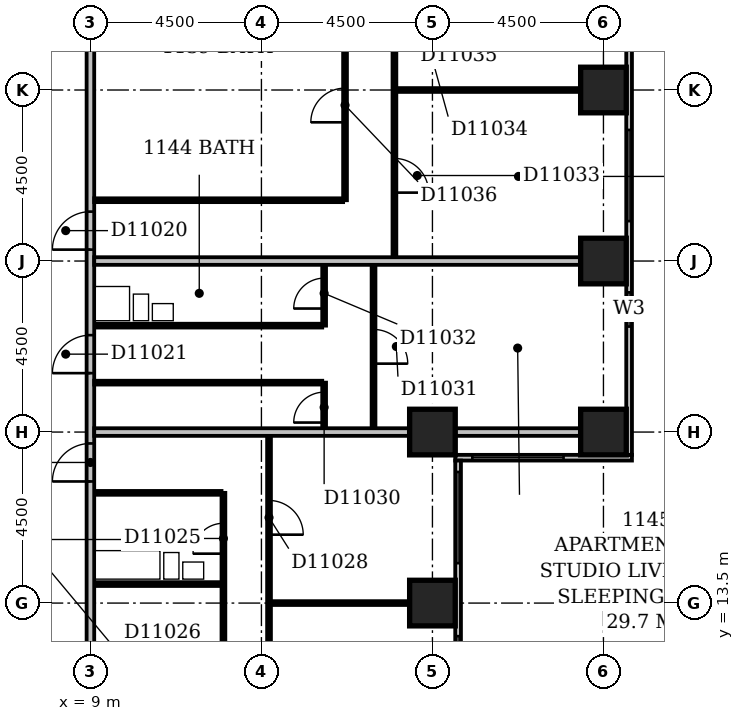
"""IFC4 building model, lengths in metres.
Left out: names, types, materials, properties, quantities, classifications, styles, units other than length and angle.
Written with IfcOpenShell. Run it as: python <this file> out.ifc"""

import sys

from ifc_helpers import new_model, si_unit, direction, frame, frame_2d, origin, origin_2d, place, context, subcontext, project, spatial, rectangle, extrude, element, fill, save


model = new_model("IFC4")
c1 = context("Model", 3, precision=1e-05, world=origin(), true_north=direction((0.0, 1.0)))
c2 = subcontext(c1, "Body", "Model", "MODEL_VIEW")
j1 = project(units=[si_unit("LENGTHUNIT", "METRE"), si_unit("PLANEANGLEUNIT", "RADIAN")], contexts=[c1])
p1 = place(None, origin())
s1 = spatial("IfcSite", under=j1, at=p1, CompositionType="ELEMENT")
p2 = place(p1, origin())
s2 = spatial("IfcBuilding", under=s1, at=p2, CompositionType="ELEMENT")
p3 = place(p2, frame((0.0, 0.0, 50.6)))
s3 = spatial("IfcBuildingStorey", under=s2, at=p3, CompositionType="ELEMENT", Elevation=50.6)
for number, where, z_axis, x_axis in (
    (1, (18.0, 13.5, -0.3), (0.0, 0.0, 1.0), (1.0, 0.0, 0.0)),
    (2, (18.0, 18.0, -0.3), (0.0, 0.0, 1.0), (1.0, 0.0, 0.0)),
    (3, (22.5, 18.0, -0.3), (0.0, 0.0, 1.0), (1.0, 0.0, 0.0)),
    (4, (22.5, 22.5, -0.3), (0.0, 0.0, 1.0), (1.0, 0.0, 0.0)),
    (5, (22.5, 27.0, -0.3), (0.0, 0.0, 1.0), (1.0, 0.0, 0.0)),
):
    element("IfcColumn", number, at=place(p3, frame(where, z_axis=z_axis, x_axis=x_axis)), inside=s3, PredefinedType="COLUMN", context=c2, shape_type="SweptSolid", body=[
        extrude(rectangle(XDim=1.2, YDim=1.2, at=origin_2d()), origin(), (0.0, 0.0, 1.0), 3.6),
    ])
p4 = place(p3, frame((18.675, 8.4, 0.0), z_axis=(0.0, 0.0, 1.0), x_axis=(0.0, 1.0, 0.0)))
e6 = element("IfcWall", 6, at=p4, inside=s3, PredefinedType="STANDARD", context=c2, shape_type="SweptSolid", body=[
    extrude(rectangle(XDim=8.85, YDim=0.15, at=frame_2d((4.425, 0.0))), origin(), (0.0, 0.0, 1.0), 2.7),
])
p5 = place(p4, frame((2.13, 0.0, 0.6)))
e7 = element("IfcOpeningElement", 7, at=p5, cuts=e6, PredefinedType="OPENING", context=c2, shape_type="SweptSolid", body=[
    extrude(rectangle(XDim=2.1, YDim=1.8, at=frame_2d((1.05, 0.9))), frame((0.0, 0.087, 0.0), z_axis=(0.0, -1.0, 0.0), x_axis=(1.0, 0.0, 0.0)), (0.0, 0.0, 1.0), 0.174),
])
p6 = place(p4, frame((6.15, 0.0, 0.6)))
e8 = element("IfcOpeningElement", 8, at=p6, cuts=e6, PredefinedType="OPENING", context=c2, shape_type="SweptSolid", body=[
    extrude(rectangle(XDim=2.4, YDim=1.8, at=frame_2d((1.2, 0.9))), frame((0.0, 0.087, 0.0), z_axis=(0.0, -1.0, 0.0), x_axis=(1.0, 0.0, 0.0)), (0.0, 0.0, 1.0), 0.174),
])
p7 = place(p3, frame((18.6, 17.325, 0.0), z_axis=(0.0, 0.0, 1.0), x_axis=(1.0, 0.0, 0.0)))
e9 = element("IfcWall", 9, at=p7, inside=s3, PredefinedType="STANDARD", context=c2, shape_type="SweptSolid", body=[
    extrude(rectangle(XDim=4.65, YDim=0.15, at=frame_2d((2.325, 0.0))), origin(), (0.0, 0.0, 1.0), 2.7),
])
p8 = place(p7, frame((0.45, 0.0, 0.6)))
e10 = element("IfcOpeningElement", 10, at=p8, cuts=e9, PredefinedType="OPENING", context=c2, shape_type="SweptSolid", body=[
    extrude(rectangle(XDim=2.4, YDim=1.8, at=frame_2d((1.2, 0.9))), frame((0.0, 0.087, 0.0), z_axis=(0.0, -1.0, 0.0), x_axis=(1.0, 0.0, 0.0)), (0.0, 0.0, 1.0), 0.174),
])
p9 = place(p3, frame((23.175, 17.4, 0.0), z_axis=(0.0, 0.0, 1.0), x_axis=(0.0, 1.0, 0.0)))
e11 = element("IfcWall", 11, at=p9, inside=s3, PredefinedType="STANDARD", context=c2, shape_type="SweptSolid", body=[
    extrude(rectangle(XDim=17.85, YDim=0.15, at=frame_2d((8.925, 0.0))), origin(), (0.0, 0.0, 1.0), 2.7),
])
p10 = place(p9, frame((3.375, 0.0, 0.6)))
e12 = element("IfcOpeningElement", 12, at=p10, cuts=e11, PredefinedType="OPENING", context=c2, shape_type="SweptSolid", body=[
    extrude(rectangle(XDim=0.9, YDim=1.8, at=frame_2d((0.45, 0.9))), frame((0.0, 0.087, 0.0), z_axis=(0.0, -1.0, 0.0), x_axis=(1.0, 0.0, 0.0)), (0.0, 0.0, 1.0), 0.174),
])
p11 = place(p9, frame((6.15, 0.0, 0.6)))
e13 = element("IfcOpeningElement", 13, at=p11, cuts=e11, PredefinedType="OPENING", context=c2, shape_type="SweptSolid", body=[
    extrude(rectangle(XDim=2.4, YDim=1.8, at=frame_2d((1.2, 0.9))), frame((0.0, 0.087, 0.0), z_axis=(0.0, -1.0, 0.0), x_axis=(1.0, 0.0, 0.0)), (0.0, 0.0, 1.0), 0.174),
])
p12 = place(p9, frame((10.65, 0.0, 0.6)))
e14 = element("IfcOpeningElement", 14, at=p12, cuts=e11, PredefinedType="OPENING", context=c2, shape_type="SweptSolid", body=[
    extrude(rectangle(XDim=2.4, YDim=1.8, at=frame_2d((1.2, 0.9))), frame((0.0, 0.087, 0.0), z_axis=(0.0, -1.0, 0.0), x_axis=(1.0, 0.0, 0.0)), (0.0, 0.0, 1.0), 0.174),
])
p13 = place(p9, frame((14.992, 0.0, 0.6)))
e15 = element("IfcOpeningElement", 15, at=p13, cuts=e11, PredefinedType="OPENING", context=c2, shape_type="SweptSolid", body=[
    extrude(rectangle(XDim=2.1, YDim=1.8, at=frame_2d((1.05, 0.9))), frame((0.0, 0.087, 0.0), z_axis=(0.0, -1.0, 0.0), x_axis=(1.0, 0.0, 0.0)), (0.0, 0.0, 1.0), 0.174),
])
p14 = place(p3, frame((9.0, 5.0, 0.0), z_axis=(0.0, 0.0, 1.0), x_axis=(0.0, 1.0, 0.0)))
e16 = element("IfcWall", 16, at=p14, inside=s3, PredefinedType="PARTITIONING", context=c2, shape_type="SweptSolid", body=[
    extrude(rectangle(XDim=44.5, YDim=0.2, at=frame_2d((22.25, 0.0))), origin(), (0.0, 0.0, 1.0), 3.3),
])
p15 = place(p14, frame((28.45, 0.0, 0.0)))
e17 = element("IfcOpeningElement", 17, at=p15, cuts=e16, PredefinedType="OPENING", context=c2, shape_type="SweptSolid", body=[
    extrude(rectangle(XDim=1.0, YDim=2.1, at=frame_2d((0.5, 1.05))), frame((0.0, 0.112, 0.0), z_axis=(0.0, -1.0, 0.0), x_axis=(1.0, 0.0, 0.0)), (0.0, 0.0, 1.0), 0.224),
])
p16 = place(p14, frame((17.8, 0.0, 0.0)))
e18 = element("IfcOpeningElement", 18, at=p16, cuts=e16, PredefinedType="OPENING", context=c2, shape_type="SweptSolid", body=[
    extrude(rectangle(XDim=1.0, YDim=2.1, at=frame_2d((0.5, 1.05))), frame((0.0, 0.112, 0.0), z_axis=(0.0, -1.0, 0.0), x_axis=(1.0, 0.0, 0.0)), (0.0, 0.0, 1.0), 0.224),
])
p17 = place(p14, frame((14.55, 0.0, 0.0)))
e19 = element("IfcOpeningElement", 19, at=p17, cuts=e16, PredefinedType="OPENING", context=c2, shape_type="SweptSolid", body=[
    extrude(rectangle(XDim=1.0, YDim=2.1, at=frame_2d((0.5, 1.05))), frame((0.0, 0.112, 0.0), z_axis=(0.0, -1.0, 0.0), x_axis=(1.0, 0.0, 0.0)), (0.0, 0.0, 1.0), 0.224),
])
p18 = place(p14, frame((11.7, 0.0, 0.0)))
e20 = element("IfcOpeningElement", 20, at=p18, cuts=e16, PredefinedType="OPENING", context=c2, shape_type="SweptSolid", body=[
    extrude(rectangle(XDim=1.0, YDim=2.1, at=frame_2d((0.5, 1.05))), frame((0.0, 0.112, 0.0), z_axis=(0.0, -1.0, 0.0), x_axis=(1.0, 0.0, 0.0)), (0.0, 0.0, 1.0), 0.224),
])
p19 = place(p14, frame((35.0, 0.0, 0.0)))
e21 = element("IfcOpeningElement", 21, at=p19, cuts=e16, PredefinedType="OPENING", context=c2, shape_type="SweptSolid", body=[
    extrude(rectangle(XDim=0.9, YDim=2.1, at=frame_2d((0.45, 1.05))), frame((0.0, 0.112, 0.0), z_axis=(0.0, -1.0, 0.0), x_axis=(1.0, 0.0, 0.0)), (0.0, 0.0, 1.0), 0.224),
])
p20 = place(p14, frame((1.5, 0.0, 0.0)))
e22 = element("IfcOpeningElement", 22, at=p20, cuts=e16, PredefinedType="OPENING", context=c2, shape_type="SweptSolid", body=[
    extrude(rectangle(XDim=0.9, YDim=2.1, at=frame_2d((0.45, 1.05))), frame((0.0, 0.112, 0.0), z_axis=(0.0, -1.0, 0.0), x_axis=(1.0, 0.0, 0.0)), (0.0, 0.0, 1.0), 0.224),
])
p21 = place(p3, frame((12.5, 9.1, 0.0), z_axis=(0.0, 0.0, 1.0), x_axis=(0.0, 1.0, 0.0)))
e23 = element("IfcWall", 23, at=p21, inside=s3, PredefinedType="PARTITIONING", context=c2, shape_type="SweptSolid", body=[
    extrude(rectangle(XDim=7.3, YDim=0.1, at=frame_2d((3.65, 0.0))), origin(), (0.0, 0.0, 1.0), 3.3),
])
p22 = place(p21, frame((5.7, 0.0, 0.0)))
e24 = element("IfcOpeningElement", 24, at=p22, cuts=e23, PredefinedType="OPENING", context=c2, shape_type="SweptSolid", body=[
    extrude(rectangle(XDim=0.8, YDim=2.1, at=frame_2d((0.4, 1.05))), frame((0.0, 0.062, 0.0), z_axis=(0.0, -1.0, 0.0), x_axis=(1.0, 0.0, 0.0)), (0.0, 0.0, 1.0), 0.124),
])
p23 = place(p21, frame((1.95, 0.0, 0.0)))
e25 = element("IfcOpeningElement", 25, at=p23, cuts=e23, PredefinedType="OPENING", context=c2, shape_type="SweptSolid", body=[
    extrude(rectangle(XDim=0.9, YDim=2.1, at=frame_2d((0.45, 1.05))), frame((0.0, 0.062, 0.0), z_axis=(0.0, -1.0, 0.0), x_axis=(1.0, 0.0, 0.0)), (0.0, 0.0, 1.0), 0.124),
])
p24 = place(p3, frame((13.7, 9.6, 0.0), z_axis=(0.0, 0.0, 1.0), x_axis=(0.0, 1.0, 0.0)))
e26 = element("IfcWall", 26, at=p24, inside=s3, PredefinedType="PARTITIONING", context=c2, shape_type="SweptSolid", body=[
    extrude(rectangle(XDim=8.3, YDim=0.1, at=frame_2d((4.15, 0.0))), origin(), (0.0, 0.0, 1.0), 3.3),
])
p25 = place(p24, frame((1.2, 0.0, 0.0)))
e27 = element("IfcOpeningElement", 27, at=p25, cuts=e26, PredefinedType="OPENING", context=c2, shape_type="SweptSolid", body=[
    extrude(rectangle(XDim=0.9, YDim=2.1, at=frame_2d((0.45, 1.05))), frame((0.0, 0.062, 0.0), z_axis=(0.0, -1.0, 0.0), x_axis=(1.0, 0.0, 0.0)), (0.0, 0.0, 1.0), 0.124),
])
p26 = place(p24, frame((5.7, 0.0, 0.0)))
e28 = element("IfcOpeningElement", 28, at=p26, cuts=e26, PredefinedType="OPENING", context=c2, shape_type="SweptSolid", body=[
    extrude(rectangle(XDim=0.9, YDim=2.1, at=frame_2d((0.45, 1.05))), frame((0.0, 0.062, 0.0), z_axis=(0.0, -1.0, 0.0), x_axis=(1.0, 0.0, 0.0)), (0.0, 0.0, 1.0), 0.124),
])
p27 = place(p3, frame((13.75, 13.5, 0.0), z_axis=(0.0, 0.0, 1.0), x_axis=(1.0, 0.0, 0.0)))
e29 = element("IfcWall", 29, at=p27, inside=s3, PredefinedType="PARTITIONING", context=c2, shape_type="SweptSolid", body=[
    extrude(rectangle(XDim=3.65, YDim=0.1, at=frame_2d((1.825, 0.0))), origin(), (0.0, 0.0, 1.0), 3.3),
])
for number, where, z_axis, x_axis in (
    (30, (9.1, 14.0, 0.0), (0.0, 0.0, 1.0), (1.0, 0.0, 0.0)),
    (31, (9.1, 16.4, 0.0), (0.0, 0.0, 1.0), (1.0, 0.0, 0.0)),
):
    element("IfcWall", number, at=place(p3, frame(where, z_axis=z_axis, x_axis=x_axis)), inside=s3, PredefinedType="PLUMBINGWALL", context=c2, shape_type="SweptSolid", body=[
        extrude(rectangle(XDim=3.35, YDim=0.1, at=frame_2d((1.675, 0.0))), origin(), (0.0, 0.0, 1.0), 3.3),
    ])
p28 = place(p3, frame((9.1, 18.0, 0.0), z_axis=(0.0, 0.0, 1.0), x_axis=(1.0, 0.0, 0.0)))
e32 = element("IfcWall", 32, at=p28, inside=s3, PredefinedType="PARTITIONING", context=c2, shape_type="SweptSolid", body=[
    extrude(rectangle(XDim=8.3, YDim=0.2, at=frame_2d((4.15, 0.0))), origin(), (0.0, 0.0, 1.0), 2.6),
])
p29 = place(p3, frame((18.6, 18.0, 0.0), z_axis=(0.0, 0.0, 1.0), x_axis=(1.0, 0.0, 0.0)))
e33 = element("IfcWall", 33, at=p29, inside=s3, PredefinedType="PARTITIONING", context=c2, shape_type="SweptSolid", body=[
    extrude(rectangle(XDim=3.3, YDim=0.2, at=frame_2d((1.65, 0.0))), origin(), (0.0, 0.0, 1.0), 2.7),
])
p30 = place(p3, frame((15.15, 18.1, 0.0), z_axis=(0.0, 0.0, 1.0), x_axis=(0.0, 1.0, 0.0)))
e34 = element("IfcWall", 34, at=p30, inside=s3, PredefinedType="PARTITIONING", context=c2, shape_type="SweptSolid", body=[
    extrude(rectangle(XDim=1.2, YDim=0.1, at=frame_2d((0.6, 0.0))), origin(), (0.0, 0.0, 1.0), 3.3),
])
p31 = place(p30, frame((0.15, 0.0, 0.0)))
e35 = element("IfcOpeningElement", 35, at=p31, cuts=e34, PredefinedType="OPENING", context=c2, shape_type="SweptSolid", body=[
    extrude(rectangle(XDim=0.8, YDim=2.1, at=frame_2d((0.4, 1.05))), frame((0.0, 0.062, 0.0), z_axis=(0.0, -1.0, 0.0), x_axis=(1.0, 0.0, 0.0)), (0.0, 0.0, 1.0), 0.124),
])
p32 = place(p3, frame((16.45, 18.1, 0.0), z_axis=(0.0, 0.0, 1.0), x_axis=(0.0, 1.0, 0.0)))
e36 = element("IfcWall", 36, at=p32, inside=s3, PredefinedType="PARTITIONING", context=c2, shape_type="SweptSolid", body=[
    extrude(rectangle(XDim=4.3, YDim=0.1, at=frame_2d((2.15, 0.0))), origin(), (0.0, 0.0, 1.0), 3.3),
])
p33 = place(p32, frame((1.7, 0.0, 0.0)))
e37 = element("IfcOpeningElement", 37, at=p33, cuts=e36, PredefinedType="OPENING", context=c2, shape_type="SweptSolid", body=[
    extrude(rectangle(XDim=0.9, YDim=2.1, at=frame_2d((0.45, 1.05))), frame((0.0, 0.062, 0.0), z_axis=(0.0, -1.0, 0.0), x_axis=(1.0, 0.0, 0.0)), (0.0, 0.0, 1.0), 0.124),
])
p34 = place(p3, frame((9.1, 19.3, 0.0), z_axis=(0.0, 0.0, 1.0), x_axis=(1.0, 0.0, 0.0)))
e38 = element("IfcWall", 38, at=p34, inside=s3, PredefinedType="PARTITIONING", context=c2, shape_type="SweptSolid", body=[
    extrude(rectangle(XDim=6.0, YDim=0.1, at=frame_2d((3.0, 0.0))), origin(), (0.0, 0.0, 1.0), 3.3),
])
p35 = place(p3, frame((9.1, 20.8, 0.0), z_axis=(0.0, 0.0, 1.0), x_axis=(1.0, 0.0, 0.0)))
e39 = element("IfcWall", 39, at=p35, inside=s3, PredefinedType="PLUMBINGWALL", context=c2, shape_type="SweptSolid", body=[
    extrude(rectangle(XDim=6.0, YDim=0.1, at=frame_2d((3.0, 0.0))), origin(), (0.0, 0.0, 1.0), 3.3),
])
p36 = place(p3, frame((15.15, 20.8, 0.0), z_axis=(0.0, 0.0, 1.0), x_axis=(0.0, 1.0, 0.0)))
e40 = element("IfcWall", 40, at=p36, inside=s3, PredefinedType="PARTITIONING", context=c2, shape_type="SweptSolid", body=[
    extrude(rectangle(XDim=1.6, YDim=0.1, at=frame_2d((0.8, 0.0))), origin(), (0.0, 0.0, 1.0), 3.3),
])
p37 = place(p36, frame((0.45, 0.0, 0.0)))
e41 = element("IfcOpeningElement", 41, at=p37, cuts=e40, PredefinedType="OPENING", context=c2, shape_type="SweptSolid", body=[
    extrude(rectangle(XDim=0.8, YDim=2.1, at=frame_2d((0.4, 1.05))), frame((0.0, 0.062, 0.0), z_axis=(0.0, -1.0, 0.0), x_axis=(1.0, 0.0, 0.0)), (0.0, 0.0, 1.0), 0.124),
])
p38 = place(p3, frame((9.1, 22.5, 0.0), z_axis=(0.0, 0.0, 1.0), x_axis=(1.0, 0.0, 0.0)))
e42 = element("IfcWall", 42, at=p38, inside=s3, PredefinedType="PARTITIONING", context=c2, shape_type="SweptSolid", body=[
    extrude(rectangle(XDim=12.8, YDim=0.2, at=frame_2d((6.4, 0.0))), origin(), (0.0, 0.0, 1.0), 3.3),
])
p39 = place(p3, frame((17.0, 22.6, 0.0), z_axis=(0.0, 0.0, 1.0), x_axis=(0.0, 1.0, 0.0)))
e43 = element("IfcWall", 43, at=p39, inside=s3, PredefinedType="PARTITIONING", context=c2, shape_type="SweptSolid", body=[
    extrude(rectangle(XDim=8.8, YDim=0.1, at=frame_2d((4.4, 0.0))), origin(), (0.0, 0.0, 1.0), 3.3),
])
p40 = place(p39, frame((1.7, 0.0, 0.0)))
e44 = element("IfcOpeningElement", 44, at=p40, cuts=e43, PredefinedType="OPENING", context=c2, shape_type="SweptSolid", body=[
    extrude(rectangle(XDim=0.9, YDim=2.1, at=frame_2d((0.45, 1.05))), frame((0.0, 0.062, 0.0), z_axis=(0.0, -1.0, 0.0), x_axis=(1.0, 0.0, 0.0)), (0.0, 0.0, 1.0), 0.124),
])
p41 = place(p39, frame((6.2, 0.0, 0.0)))
e45 = element("IfcOpeningElement", 45, at=p41, cuts=e43, PredefinedType="OPENING", context=c2, shape_type="SweptSolid", body=[
    extrude(rectangle(XDim=0.9, YDim=2.1, at=frame_2d((0.45, 1.05))), frame((0.0, 0.062, 0.0), z_axis=(0.0, -1.0, 0.0), x_axis=(1.0, 0.0, 0.0)), (0.0, 0.0, 1.0), 0.124),
])
p42 = place(p3, frame((9.1, 24.1, 0.0), z_axis=(0.0, 0.0, 1.0), x_axis=(1.0, 0.0, 0.0)))
e46 = element("IfcWall", 46, at=p42, inside=s3, PredefinedType="PARTITIONING", context=c2, shape_type="SweptSolid", body=[
    extrude(rectangle(XDim=6.55, YDim=0.1, at=frame_2d((3.275, 0.0))), origin(), (0.0, 0.0, 1.0), 3.3),
])
p43 = place(p3, frame((15.7, 24.1, 0.0), z_axis=(0.0, 0.0, 1.0), x_axis=(0.0, 1.0, 0.0)))
e47 = element("IfcWall", 47, at=p43, inside=s3, PredefinedType="PARTITIONING", context=c2, shape_type="SweptSolid", body=[
    extrude(rectangle(XDim=7.3, YDim=0.1, at=frame_2d((3.65, 0.0))), origin(), (0.0, 0.0, 1.0), 3.3),
])
p44 = place(p43, frame((5.8, 0.0, 0.0)))
e48 = element("IfcOpeningElement", 48, at=p44, cuts=e47, PredefinedType="OPENING", context=c2, shape_type="SweptSolid", body=[
    extrude(rectangle(XDim=0.8, YDim=2.1, at=frame_2d((0.4, 1.05))), frame((0.0, 0.062, 0.0), z_axis=(0.0, -1.0, 0.0), x_axis=(1.0, 0.0, 0.0)), (0.0, 0.0, 1.0), 0.124),
])
p45 = place(p43, frame((2.05, 0.0, 0.0)))
e49 = element("IfcOpeningElement", 49, at=p45, cuts=e47, PredefinedType="OPENING", context=c2, shape_type="SweptSolid", body=[
    extrude(rectangle(XDim=0.9, YDim=2.1, at=frame_2d((0.45, 1.05))), frame((0.0, 0.062, 0.0), z_axis=(0.0, -1.0, 0.0), x_axis=(1.0, 0.0, 0.0)), (0.0, 0.0, 1.0), 0.124),
])
p46 = place(p3, frame((17.05, 27.0, 0.0), z_axis=(0.0, 0.0, 1.0), x_axis=(1.0, 0.0, 0.0)))
e50 = element("IfcWall", 50, at=p46, inside=s3, PredefinedType="PARTITIONING", context=c2, shape_type="SweptSolid", body=[
    extrude(rectangle(XDim=4.85, YDim=0.1, at=frame_2d((2.425, 0.0))), origin(), (0.0, 0.0, 1.0), 2.7),
])
p47 = place(p5, origin())
e51 = element("IfcWindow", 51, at=p47, inside=s3, PartitioningType="SINGLE_PANEL", PredefinedType="WINDOW", context=c2, shape_type="SweptSolid", body=[
    extrude(rectangle(XDim=2.1, YDim=1.8, at=frame_2d((1.05, 0.9))), frame((0.0, 0.03, 0.0), z_axis=(0.0, -1.0, 0.0), x_axis=(1.0, 0.0, 0.0)), (0.0, 0.0, 1.0), 0.06),
])
fill(e7, e51)
p48 = place(p6, origin())
e52 = element("IfcWindow", 52, at=p48, inside=s3, PartitioningType="SINGLE_PANEL", PredefinedType="WINDOW", context=c2, shape_type="SweptSolid", body=[
    extrude(rectangle(XDim=2.4, YDim=1.8, at=frame_2d((1.2, 0.9))), frame((0.0, 0.03, 0.0), z_axis=(0.0, -1.0, 0.0), x_axis=(1.0, 0.0, 0.0)), (0.0, 0.0, 1.0), 0.06),
])
fill(e8, e52)
p49 = place(p8, origin())
e53 = element("IfcWindow", 53, at=p49, inside=s3, PartitioningType="SINGLE_PANEL", PredefinedType="WINDOW", context=c2, shape_type="SweptSolid", body=[
    extrude(rectangle(XDim=2.4, YDim=1.8, at=frame_2d((1.2, 0.9))), frame((0.0, 0.03, 0.0), z_axis=(0.0, -1.0, 0.0), x_axis=(1.0, 0.0, 0.0)), (0.0, 0.0, 1.0), 0.06),
])
fill(e10, e53)
p50 = place(p10, origin())
e54 = element("IfcWindow", 54, at=p50, inside=s3, PartitioningType="SINGLE_PANEL", PredefinedType="WINDOW", context=c2, shape_type="SweptSolid", body=[
    extrude(rectangle(XDim=0.9, YDim=1.8, at=frame_2d((0.45, 0.9))), frame((0.0, 0.03, 0.0), z_axis=(0.0, -1.0, 0.0), x_axis=(1.0, 0.0, 0.0)), (0.0, 0.0, 1.0), 0.06),
])
fill(e12, e54)
p51 = place(p11, origin())
e55 = element("IfcWindow", 55, at=p51, inside=s3, PartitioningType="SINGLE_PANEL", PredefinedType="WINDOW", context=c2, shape_type="SweptSolid", body=[
    extrude(rectangle(XDim=2.4, YDim=1.8, at=frame_2d((1.2, 0.9))), frame((0.0, 0.03, 0.0), z_axis=(0.0, -1.0, 0.0), x_axis=(1.0, 0.0, 0.0)), (0.0, 0.0, 1.0), 0.06),
])
fill(e13, e55)
p52 = place(p16, origin())
e56 = element("IfcDoor", 56, at=p52, inside=s3, OperationType="SINGLE_SWING_LEFT", PredefinedType="DOOR", context=c2, shape_type="SweptSolid", body=[
    extrude(rectangle(XDim=1.0, YDim=2.1, at=frame_2d((0.5, 1.05))), frame((0.0, 0.025, 0.0), z_axis=(0.0, -1.0, 0.0), x_axis=(1.0, 0.0, 0.0)), (0.0, 0.0, 1.0), 0.05),
])
fill(e18, e56)
p53 = place(p17, origin())
e57 = element("IfcDoor", 57, at=p53, inside=s3, OperationType="SINGLE_SWING_LEFT", PredefinedType="DOOR", context=c2, shape_type="SweptSolid", body=[
    extrude(rectangle(XDim=1.0, YDim=2.1, at=frame_2d((0.5, 1.05))), frame((0.0, 0.025, 0.0), z_axis=(0.0, -1.0, 0.0), x_axis=(1.0, 0.0, 0.0)), (0.0, 0.0, 1.0), 0.05),
])
fill(e19, e57)
p54 = place(p18, origin())
e58 = element("IfcDoor", 58, at=p54, inside=s3, OperationType="SINGLE_SWING_LEFT", PredefinedType="DOOR", context=c2, shape_type="SweptSolid", body=[
    extrude(rectangle(XDim=1.0, YDim=2.1, at=frame_2d((0.5, 1.05))), frame((0.0, 0.025, 0.0), z_axis=(0.0, -1.0, 0.0), x_axis=(1.0, 0.0, 0.0)), (0.0, 0.0, 1.0), 0.05),
])
fill(e20, e58)
p55 = place(p22, origin())
e59 = element("IfcDoor", 59, at=p55, inside=s3, OperationType="SINGLE_SWING_LEFT", PredefinedType="DOOR", context=c2, shape_type="SweptSolid", body=[
    extrude(rectangle(XDim=0.8, YDim=2.1, at=frame_2d((0.4, 1.05))), frame((0.0, 0.025, 0.0), z_axis=(0.0, -1.0, 0.0), x_axis=(1.0, 0.0, 0.0)), (0.0, 0.0, 1.0), 0.05),
])
fill(e24, e59)
p56 = place(p26, frame((0.9, 0.0, 0.0), z_axis=(0.0, 0.0, 1.0), x_axis=(-1.0, 0.0, 0.0)))
e60 = element("IfcDoor", 60, at=p56, inside=s3, OperationType="SINGLE_SWING_RIGHT", PredefinedType="DOOR", context=c2, shape_type="SweptSolid", body=[
    extrude(rectangle(XDim=0.9, YDim=2.1, at=frame_2d((0.45, 1.05))), frame((0.0, 0.025, 0.0), z_axis=(0.0, -1.0, 0.0), x_axis=(1.0, 0.0, 0.0)), (0.0, 0.0, 1.0), 0.05),
])
fill(e28, e60)
p57 = place(p31, origin())
e61 = element("IfcDoor", 61, at=p57, inside=s3, OperationType="SINGLE_SWING_LEFT", PredefinedType="DOOR", context=c2, shape_type="SweptSolid", body=[
    extrude(rectangle(XDim=0.8, YDim=2.1, at=frame_2d((0.4, 1.05))), frame((0.0, 0.025, 0.0), z_axis=(0.0, -1.0, 0.0), x_axis=(1.0, 0.0, 0.0)), (0.0, 0.0, 1.0), 0.05),
])
fill(e35, e61)
p58 = place(p33, frame((0.9, 0.0, 0.0), z_axis=(0.0, 0.0, 1.0), x_axis=(-1.0, 0.0, 0.0)))
e62 = element("IfcDoor", 62, at=p58, inside=s3, OperationType="SINGLE_SWING_RIGHT", PredefinedType="DOOR", context=c2, shape_type="SweptSolid", body=[
    extrude(rectangle(XDim=0.9, YDim=2.1, at=frame_2d((0.45, 1.05))), frame((0.0, 0.025, 0.0), z_axis=(0.0, -1.0, 0.0), x_axis=(1.0, 0.0, 0.0)), (0.0, 0.0, 1.0), 0.05),
])
fill(e37, e62)
p59 = place(p37, origin())
e63 = element("IfcDoor", 63, at=p59, inside=s3, OperationType="SINGLE_SWING_LEFT", PredefinedType="DOOR", context=c2, shape_type="SweptSolid", body=[
    extrude(rectangle(XDim=0.8, YDim=2.1, at=frame_2d((0.4, 1.05))), frame((0.0, 0.025, 0.0), z_axis=(0.0, -1.0, 0.0), x_axis=(1.0, 0.0, 0.0)), (0.0, 0.0, 1.0), 0.05),
])
fill(e41, e63)
p60 = place(p40, frame((0.9, 0.0, 0.0), z_axis=(0.0, 0.0, 1.0), x_axis=(-1.0, 0.0, 0.0)))
e64 = element("IfcDoor", 64, at=p60, inside=s3, OperationType="SINGLE_SWING_RIGHT", PredefinedType="DOOR", context=c2, shape_type="SweptSolid", body=[
    extrude(rectangle(XDim=0.9, YDim=2.1, at=frame_2d((0.45, 1.05))), frame((0.0, 0.025, 0.0), z_axis=(0.0, -1.0, 0.0), x_axis=(1.0, 0.0, 0.0)), (0.0, 0.0, 1.0), 0.05),
])
fill(e44, e64)
p61 = place(p45, origin())
e65 = element("IfcDoor", 65, at=p61, inside=s3, OperationType="SINGLE_SWING_LEFT", PredefinedType="DOOR", context=c2, shape_type="SweptSolid", body=[
    extrude(rectangle(XDim=0.9, YDim=2.1, at=frame_2d((0.45, 1.05))), frame((0.0, 0.025, 0.0), z_axis=(0.0, -1.0, 0.0), x_axis=(1.0, 0.0, 0.0)), (0.0, 0.0, 1.0), 0.05),
])
fill(e49, e65)
save(model, sys.argv[1])
